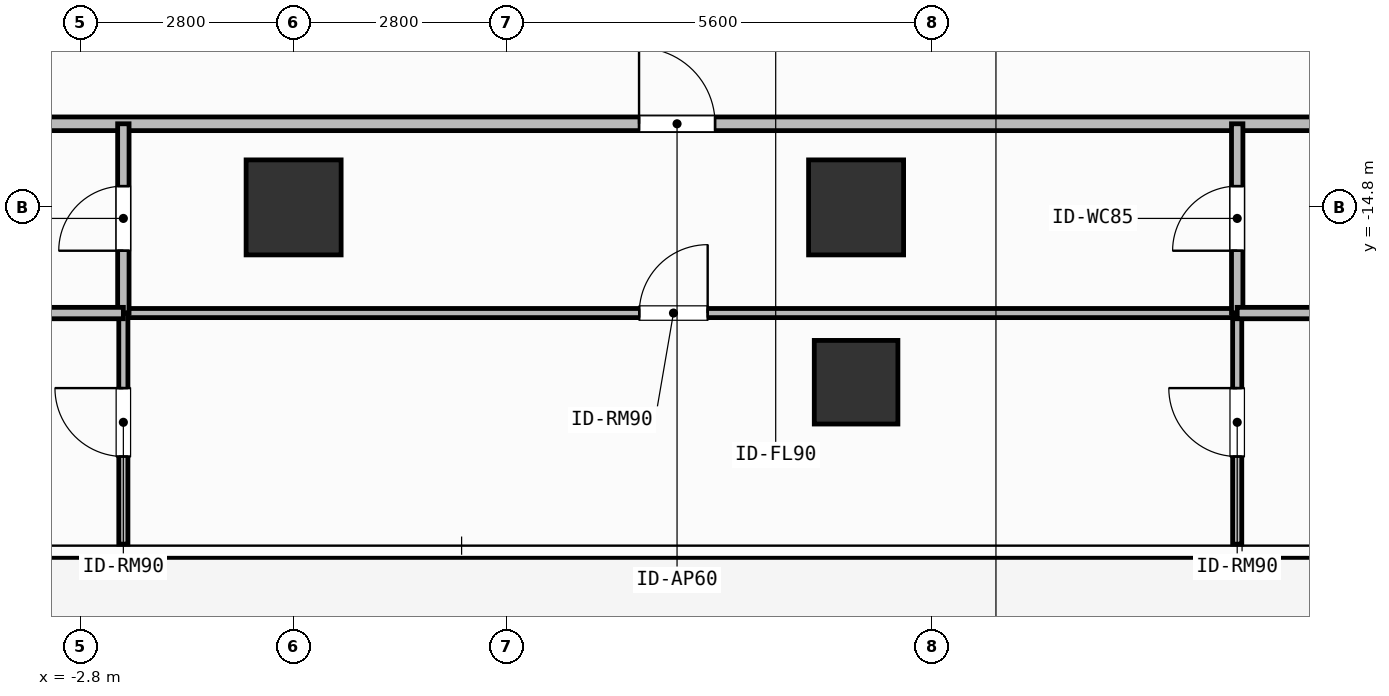
"""IFC4 building model, lengths in metres.
Left out: names, types, materials, properties, quantities, classifications, styles, units other than length and angle.
Written with IfcOpenShell. Run it as: python <this file> out.ifc"""

import sys

from ifc_helpers import new_model, si_unit, direction, frame, frame_2d, origin, origin_2d, place, context, subcontext, project, spatial, rectangle, extrude, element, fill, save


model = new_model("IFC4")
c1 = context("Model", 3, precision=1e-05, world=origin(), true_north=direction((0.0, 1.0)))
c2 = subcontext(c1, "Body", "Model", "MODEL_VIEW")
j1 = project(units=[si_unit("LENGTHUNIT", "METRE"), si_unit("PLANEANGLEUNIT", "RADIAN")], contexts=[c1])
p1 = place(None, origin())
s1 = spatial("IfcSite", under=j1, at=p1, CompositionType="ELEMENT")
p2 = place(p1, origin())
s2 = spatial("IfcBuilding", under=s1, at=p2, CompositionType="ELEMENT")
p3 = place(p2, frame((0.0, 0.0, 85.2)))
s3 = spatial("IfcBuildingStorey", under=s2, at=p3, CompositionType="ELEMENT", Elevation=85.2)
for number, where, z_axis, x_axis in (
    (1, (0.0, -14.8, 0.0), (0.0, 0.0, 1.0), (1.0, 0.0, 0.0)),
    (2, (7.4, -14.8, 0.0), (0.0, 0.0, 1.0), (1.0, 0.0, 0.0)),
):
    element("IfcColumn", number, at=place(p3, frame(where, z_axis=z_axis, x_axis=x_axis)), inside=s3, PredefinedType="COLUMN", context=c2, shape_type="SweptSolid", body=[
        extrude(rectangle(XDim=1.25, YDim=1.25, at=origin_2d()), origin(), (0.0, 0.0, 1.0), 3.9),
    ])
p4 = place(p3, frame((7.4, -17.1, 0.0), z_axis=(0.0, 0.0, 1.0), x_axis=(1.0, 0.0, 0.0)))
e3 = element("IfcColumn", 3, at=p4, inside=s3, PredefinedType="COLUMN", context=c2, shape_type="SweptSolid", body=[
    extrude(rectangle(XDim=1.1, YDim=1.1, at=origin_2d()), origin(), (0.0, 0.0, 1.0), 3.9),
])
p5 = place(p3, frame((-7.634, -13.7, 0.0), z_axis=(0.0, 0.0, 1.0), x_axis=(1.0, 0.0, 0.0)))
e4 = element("IfcWall", 4, at=p5, inside=s3, PredefinedType="PARTITIONING", context=c2, shape_type="SweptSolid", body=[
    extrude(rectangle(XDim=26.254, YDim=0.18, at=frame_2d((13.127, 0.0))), origin(), (0.0, 0.0, 1.0), 3.68),
])
p6 = place(p5, frame((12.178, 0.0, 0.0)))
e5 = element("IfcOpeningElement", 5, at=p6, cuts=e4, PredefinedType="OPENING", context=c2, shape_type="SweptSolid", body=[
    extrude(rectangle(XDim=1.0, YDim=2.2, at=frame_2d((0.5, 1.1))), frame((0.0, 0.1, 0.0), z_axis=(0.0, -1.0, 0.0), x_axis=(1.0, 0.0, 0.0)), (0.0, 0.0, 1.0), 0.2),
])
p7 = place(p3, frame((-2.24, -16.19, 0.0), z_axis=(0.0, 0.0, 1.0), x_axis=(1.0, 0.0, 0.0)))
e6 = element("IfcWall", 6, at=p7, inside=s3, PredefinedType="PARTITIONING", context=c2, shape_type="SweptSolid", body=[
    extrude(rectangle(XDim=14.654, YDim=0.12, at=frame_2d((7.327, 0.0))), origin(), (0.0, 0.0, 1.0), 3.68),
])
p8 = place(p7, frame((6.787, 0.0, 0.0)))
e7 = element("IfcOpeningElement", 7, at=p8, cuts=e6, PredefinedType="OPENING", context=c2, shape_type="SweptSolid", body=[
    extrude(rectangle(XDim=0.9, YDim=2.1, at=frame_2d((0.45, 1.05))), frame((0.0, 0.07, 0.0), z_axis=(0.0, -1.0, 0.0), x_axis=(1.0, 0.0, 0.0)), (0.0, 0.0, 1.0), 0.14),
])
p9 = place(p3, frame((-2.24, -16.19, 0.0), z_axis=(0.0, 0.0, 1.0), x_axis=(0.0, 1.0, 0.0)))
e8 = element("IfcWall", 8, at=p9, inside=s3, PredefinedType="PARTITIONING", context=c2, shape_type="SweptSolid", body=[
    extrude(rectangle(XDim=2.49, YDim=0.15, at=frame_2d((1.245, 0.0))), origin(), (0.0, 0.0, 1.0), 3.68),
])
p10 = place(p9, frame((0.82, 0.0, 0.0)))
e9 = element("IfcOpeningElement", 9, at=p10, cuts=e8, PredefinedType="OPENING", context=c2, shape_type="SweptSolid", body=[
    extrude(rectangle(XDim=0.85, YDim=2.1, at=frame_2d((0.425, 1.05))), frame((0.0, 0.085, 0.0), z_axis=(0.0, -1.0, 0.0), x_axis=(1.0, 0.0, 0.0)), (0.0, 0.0, 1.0), 0.17),
])
p11 = place(p3, frame((-2.24, -19.23, 0.0), z_axis=(0.0, 0.0, 1.0), x_axis=(0.0, 1.0, 0.0)))
e10 = element("IfcWall", 10, at=p11, inside=s3, PredefinedType="PARTITIONING", context=c2, shape_type="SweptSolid", body=[
    extrude(rectangle(XDim=3.04, YDim=0.12, at=frame_2d((1.52, 0.0))), origin(), (0.0, 0.0, 1.0), 3.68),
])
p12 = place(p11, frame((1.153, 0.0, 0.0)))
e11 = element("IfcOpeningElement", 11, at=p12, cuts=e10, PredefinedType="OPENING", context=c2, shape_type="SweptSolid", body=[
    extrude(rectangle(XDim=0.9, YDim=2.1, at=frame_2d((0.45, 1.05))), frame((0.0, 0.07, 0.0), z_axis=(0.0, -1.0, 0.0), x_axis=(1.0, 0.0, 0.0)), (0.0, 0.0, 1.0), 0.14),
])
p13 = place(p3, frame((12.414, -16.19, 0.0), z_axis=(0.0, 0.0, 1.0), x_axis=(0.0, 1.0, 0.0)))
e12 = element("IfcWall", 12, at=p13, inside=s3, PredefinedType="PARTITIONING", context=c2, shape_type="SweptSolid", body=[
    extrude(rectangle(XDim=2.49, YDim=0.15, at=frame_2d((1.245, 0.0))), origin(), (0.0, 0.0, 1.0), 3.68),
])
p14 = place(p13, frame((0.82, 0.0, 0.0)))
e13 = element("IfcOpeningElement", 13, at=p14, cuts=e12, PredefinedType="OPENING", context=c2, shape_type="SweptSolid", body=[
    extrude(rectangle(XDim=0.85, YDim=2.1, at=frame_2d((0.425, 1.05))), frame((0.0, 0.085, 0.0), z_axis=(0.0, -1.0, 0.0), x_axis=(1.0, 0.0, 0.0)), (0.0, 0.0, 1.0), 0.17),
])
p15 = place(p3, frame((12.414, -19.23, 0.0), z_axis=(0.0, 0.0, 1.0), x_axis=(0.0, 1.0, 0.0)))
e14 = element("IfcWall", 14, at=p15, inside=s3, PredefinedType="PARTITIONING", context=c2, shape_type="SweptSolid", body=[
    extrude(rectangle(XDim=3.04, YDim=0.12, at=frame_2d((1.52, 0.0))), origin(), (0.0, 0.0, 1.0), 3.68),
])
p16 = place(p15, frame((1.153, 0.0, 0.0)))
e15 = element("IfcOpeningElement", 15, at=p16, cuts=e14, PredefinedType="OPENING", context=c2, shape_type="SweptSolid", body=[
    extrude(rectangle(XDim=0.9, YDim=2.1, at=frame_2d((0.45, 1.05))), frame((0.0, 0.07, 0.0), z_axis=(0.0, -1.0, 0.0), x_axis=(1.0, 0.0, 0.0)), (0.0, 0.0, 1.0), 0.14),
])
p17 = place(p3, frame((-7.634, -16.19, 0.0), z_axis=(0.0, 0.0, 1.0), x_axis=(1.0, 0.0, 0.0)))
e16 = element("IfcWall", 16, at=p17, inside=s3, PredefinedType="PARTITIONING", context=c2, shape_type="SweptSolid", body=[
    extrude(rectangle(XDim=5.394, YDim=0.15, at=frame_2d((2.697, 0.0))), origin(), (0.0, 0.0, 1.0), 3.68),
])
p18 = place(p3, frame((12.414, -16.19, 0.0), z_axis=(0.0, 0.0, 1.0), x_axis=(1.0, 0.0, 0.0)))
e17 = element("IfcWall", 17, at=p18, inside=s3, PredefinedType="PARTITIONING", context=c2, shape_type="SweptSolid", body=[
    extrude(rectangle(XDim=6.206, YDim=0.15, at=frame_2d((3.103, 0.0))), origin(), (0.0, 0.0, 1.0), 3.68),
])
p19 = place(p6, origin())
e18 = element("IfcDoor", 18, at=p19, inside=s3, OperationType="SINGLE_SWING_LEFT", PredefinedType="DOOR", context=c2, shape_type="SweptSolid", body=[
    extrude(rectangle(XDim=1.0, YDim=2.2, at=frame_2d((0.5, 1.1))), frame((0.0, 0.025, 0.0), z_axis=(0.0, -1.0, 0.0), x_axis=(1.0, 0.0, 0.0)), (0.0, 0.0, 1.0), 0.05),
])
fill(e5, e18)
p20 = place(p8, origin())
e19 = element("IfcDoor", 19, at=p20, inside=s3, OperationType="SINGLE_SWING_RIGHT", PredefinedType="DOOR", context=c2, shape_type="SweptSolid", body=[
    extrude(rectangle(XDim=0.9, YDim=2.1, at=frame_2d((0.45, 1.05))), frame((0.0, 0.025, 0.0), z_axis=(0.0, -1.0, 0.0), x_axis=(1.0, 0.0, 0.0)), (0.0, 0.0, 1.0), 0.05),
])
fill(e7, e19)
p21 = place(p10, origin())
e20 = element("IfcDoor", 20, at=p21, inside=s3, OperationType="SINGLE_SWING_LEFT", PredefinedType="DOOR", context=c2, shape_type="SweptSolid", body=[
    extrude(rectangle(XDim=0.85, YDim=2.1, at=frame_2d((0.425, 1.05))), frame((0.0, 0.025, 0.0), z_axis=(0.0, -1.0, 0.0), x_axis=(1.0, 0.0, 0.0)), (0.0, 0.0, 1.0), 0.05),
])
fill(e9, e20)
p22 = place(p12, origin())
e21 = element("IfcDoor", 21, at=p22, inside=s3, OperationType="SINGLE_SWING_RIGHT", PredefinedType="DOOR", context=c2, shape_type="SweptSolid", body=[
    extrude(rectangle(XDim=0.9, YDim=2.1, at=frame_2d((0.45, 1.05))), frame((0.0, 0.025, 0.0), z_axis=(0.0, -1.0, 0.0), x_axis=(1.0, 0.0, 0.0)), (0.0, 0.0, 1.0), 0.05),
])
fill(e11, e21)
p23 = place(p14, origin())
e22 = element("IfcDoor", 22, at=p23, inside=s3, OperationType="SINGLE_SWING_LEFT", PredefinedType="DOOR", context=c2, shape_type="SweptSolid", body=[
    extrude(rectangle(XDim=0.85, YDim=2.1, at=frame_2d((0.425, 1.05))), frame((0.0, 0.025, 0.0), z_axis=(0.0, -1.0, 0.0), x_axis=(1.0, 0.0, 0.0)), (0.0, 0.0, 1.0), 0.05),
])
fill(e13, e22)
p24 = place(p16, origin())
e23 = element("IfcDoor", 23, at=p24, inside=s3, OperationType="SINGLE_SWING_RIGHT", PredefinedType="DOOR", context=c2, shape_type="SweptSolid", body=[
    extrude(rectangle(XDim=0.9, YDim=2.1, at=frame_2d((0.45, 1.05))), frame((0.0, 0.025, 0.0), z_axis=(0.0, -1.0, 0.0), x_axis=(1.0, 0.0, 0.0)), (0.0, 0.0, 1.0), 0.05),
])
fill(e15, e23)
save(model, sys.argv[1])
